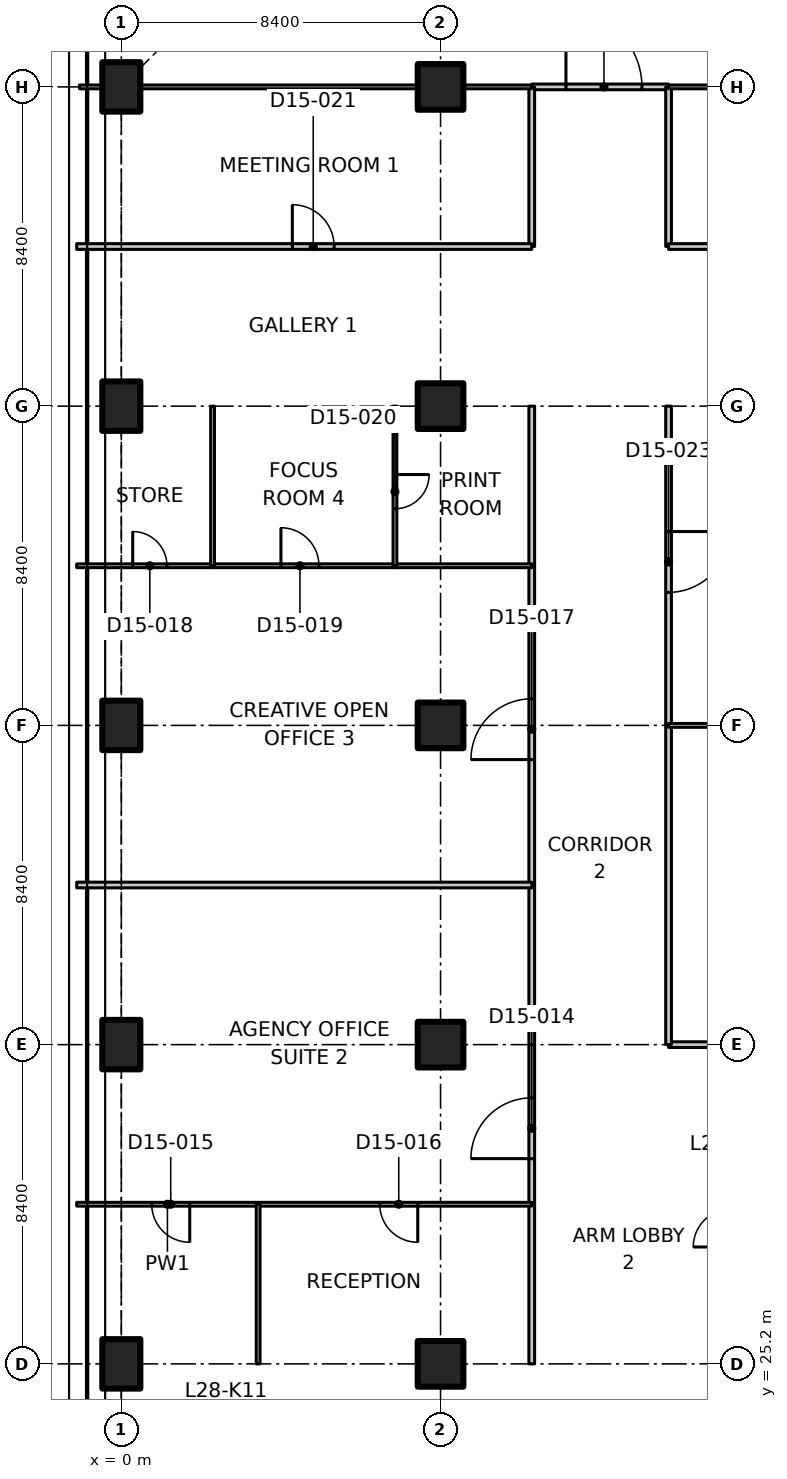
"""IFC4 building model, lengths in metres.
Left out: names, types, materials, properties, quantities, classifications, styles, units other than length and angle.
Written with IfcOpenShell. Run it as: python <this file> out.ifc"""

import sys

from ifc_helpers import new_model, si_unit, direction, frame, frame_2d, origin, origin_2d, place, context, subcontext, project, spatial, polyline, rectangle, outline, extrude, element, fill, save


model = new_model("IFC4")
c1 = context("Model", 3, precision=1e-05, world=origin(), true_north=direction((0.0, 1.0)))
c2 = subcontext(c1, "Body", "Model", "MODEL_VIEW")
j1 = project(units=[si_unit("LENGTHUNIT", "METRE"), si_unit("PLANEANGLEUNIT", "RADIAN")], contexts=[c1])
p1 = place(None, origin())
s1 = spatial("IfcSite", under=j1, at=p1, CompositionType="ELEMENT")
p2 = place(p1, origin())
s2 = spatial("IfcBuilding", under=s1, at=p2, CompositionType="ELEMENT")
p3 = place(p2, frame((0.0, 0.0, 116.9)))
s3 = spatial("IfcBuildingStorey", under=s2, at=p3, CompositionType="ELEMENT", Elevation=116.9)
for number, where, z_axis, x_axis in (
    (1, (0.0, 25.2, 0.0), (0.0, 0.0, 1.0), (1.0, 0.0, 0.0)),
    (2, (0.0, 33.6, 0.0), (0.0, 0.0, 1.0), (1.0, 0.0, 0.0)),
    (3, (0.0, 42.0, 0.0), (0.0, 0.0, 1.0), (1.0, 0.0, 0.0)),
    (4, (0.0, 50.4, 0.0), (0.0, 0.0, 1.0), (1.0, 0.0, 0.0)),
    (5, (0.0, 58.8, 0.0), (0.0, 0.0, 1.0), (1.0, 0.0, 0.0)),
):
    element("IfcColumn", number, at=place(p3, frame(where, z_axis=z_axis, x_axis=x_axis)), inside=s3, PredefinedType="COLUMN", context=c2, shape_type="SweptSolid", body=[
        extrude(rectangle(XDim=1.0, YDim=1.3, at=origin_2d()), origin(), (0.0, 0.0, 1.0), 3.35),
    ])
for number, where, z_axis, x_axis in (
    (6, (8.4, 25.2, 0.0), (0.0, 0.0, 1.0), (1.0, 0.0, 0.0)),
    (7, (8.4, 33.6, 0.0), (0.0, 0.0, 1.0), (1.0, 0.0, 0.0)),
    (8, (8.4, 42.0, 0.0), (0.0, 0.0, 1.0), (1.0, 0.0, 0.0)),
    (9, (8.4, 50.4, 0.0), (0.0, 0.0, 1.0), (1.0, 0.0, 0.0)),
    (10, (8.4, 58.8, 0.0), (0.0, 0.0, 1.0), (1.0, 0.0, 0.0)),
):
    element("IfcColumn", number, at=place(p3, frame(where, z_axis=z_axis, x_axis=x_axis)), inside=s3, PredefinedType="COLUMN", context=c2, shape_type="SweptSolid", body=[
        extrude(rectangle(XDim=1.2, YDim=1.2, at=origin_2d()), origin(), (0.0, 0.0, 1.0), 3.35),
    ])
p4 = place(p3, frame((10.8, 29.4, 0.0), z_axis=(0.0, 0.0, 1.0), x_axis=(0.0, 1.0, 0.0)))
e11 = element("IfcWall", 11, at=p4, inside=s3, PredefinedType="PARTITIONING", context=c2, shape_type="SweptSolid", body=[
    extrude(rectangle(XDim=4.2, YDim=0.15, at=frame_2d((2.1, 0.0))), origin(), (0.0, 0.0, 1.0), 3.33),
])
p5 = place(p4, frame((1.2, 0.0, 0.0)))
e12 = element("IfcOpeningElement", 12, at=p5, cuts=e11, PredefinedType="OPENING", context=c2, shape_type="SweptSolid", body=[
    extrude(rectangle(XDim=1.6, YDim=2.1, at=frame_2d((0.8, 1.05))), frame((0.0, 0.085, 0.0), z_axis=(0.0, -1.0, 0.0), x_axis=(1.0, 0.0, 0.0)), (0.0, 0.0, 1.0), 0.17),
])
p6 = place(p3, frame((10.8, 25.2, 0.0), z_axis=(0.0, 0.0, 1.0), x_axis=(0.0, 1.0, 0.0)))
e13 = element("IfcWall", 13, at=p6, inside=s3, PredefinedType="PARTITIONING", context=c2, shape_type="SweptSolid", body=[
    extrude(rectangle(XDim=4.2, YDim=0.15, at=frame_2d((2.1, 0.0))), origin(), (0.0, 0.0, 1.0), 3.33),
])
p7 = place(p3, frame((14.4, 33.6, 0.0), z_axis=(0.0, 0.0, 1.0), x_axis=(1.0, 0.0, 0.0)))
e14 = element("IfcWall", 14, at=p7, inside=s3, PredefinedType="PARTITIONING", context=c2, shape_type="SweptSolid", body=[
    extrude(rectangle(XDim=1.5, YDim=0.15, at=frame_2d((0.75, 0.0))), origin(), (0.0, 0.0, 1.0), 3.33),
])
p8 = place(p3, frame((10.8, 58.8, 0.0), z_axis=(0.0, 0.0, 1.0), x_axis=(1.0, 0.0, 0.0)))
e15 = element("IfcWall", 15, at=p8, inside=s3, PredefinedType="PARTITIONING", context=c2, shape_type="SweptSolid", body=[
    extrude(rectangle(XDim=3.6, YDim=0.15, at=frame_2d((1.8, 0.0))), origin(), (0.0, 0.0, 1.0), 3.33),
])
p9 = place(p8, frame((0.9, 0.0, 0.0)))
e16 = element("IfcOpeningElement", 16, at=p9, cuts=e15, PredefinedType="OPENING", context=c2, shape_type="SweptSolid", body=[
    extrude(rectangle(XDim=2.0, YDim=2.4, at=frame_2d((1.0, 1.2))), frame((0.0, 0.085, 0.0), z_axis=(0.0, -1.0, 0.0), x_axis=(1.0, 0.0, 0.0)), (0.0, 0.0, 1.0), 0.17),
])
p10 = place(p3, frame((10.8, 33.6, 0.0), z_axis=(0.0, 0.0, 1.0), x_axis=(0.0, 1.0, 0.0)))
e17 = element("IfcWall", 17, at=p10, inside=s3, PredefinedType="PARTITIONING", context=c2, shape_type="SweptSolid", body=[
    extrude(rectangle(XDim=4.2, YDim=0.15, at=frame_2d((2.1, 0.0))), origin(), (0.0, 0.0, 1.0), 3.33),
])
p11 = place(p3, frame((10.8, 37.8, 0.0), z_axis=(0.0, 0.0, 1.0), x_axis=(0.0, 1.0, 0.0)))
e18 = element("IfcWall", 18, at=p11, inside=s3, PredefinedType="PARTITIONING", context=c2, shape_type="SweptSolid", body=[
    extrude(rectangle(XDim=8.4, YDim=0.15, at=frame_2d((4.2, 0.0))), origin(), (0.0, 0.0, 1.0), 3.33),
])
p12 = place(p11, frame((3.3, 0.0, 0.0)))
e19 = element("IfcOpeningElement", 19, at=p12, cuts=e18, PredefinedType="OPENING", context=c2, shape_type="SweptSolid", body=[
    extrude(rectangle(XDim=1.6, YDim=2.1, at=frame_2d((0.8, 1.05))), frame((0.0, 0.085, 0.0), z_axis=(0.0, -1.0, 0.0), x_axis=(1.0, 0.0, 0.0)), (0.0, 0.0, 1.0), 0.17),
])
for number, where, z_axis, x_axis in (
    (20, (10.8, 46.2, 0.0), (0.0, 0.0, 1.0), (0.0, 1.0, 0.0)),
    (21, (10.8, 54.6, 0.0), (0.0, 0.0, 1.0), (0.0, 1.0, 0.0)),
):
    element("IfcWall", number, at=place(p3, frame(where, z_axis=z_axis, x_axis=x_axis)), inside=s3, PredefinedType="PARTITIONING", context=c2, shape_type="SweptSolid", body=[
        extrude(rectangle(XDim=4.2, YDim=0.15, at=frame_2d((2.1, 0.0))), origin(), (0.0, 0.0, 1.0), 3.33),
    ])
p13 = place(p3, frame((14.4, 42.0, 0.0), z_axis=(0.0, 0.0, 1.0), x_axis=(0.0, -1.0, 0.0)))
e22 = element("IfcWall", 22, at=p13, inside=s3, PredefinedType="PARTITIONING", context=c2, shape_type="SweptSolid", body=[
    extrude(rectangle(XDim=8.4, YDim=0.15, at=frame_2d((4.2, 0.0))), origin(), (0.0, 0.0, 1.0), 3.33),
])
p14 = place(p3, frame((14.4, 50.4, 0.0), z_axis=(0.0, 0.0, 1.0), x_axis=(0.0, -1.0, 0.0)))
e23 = element("IfcWall", 23, at=p14, inside=s3, PredefinedType="PARTITIONING", context=c2, shape_type="SweptSolid", body=[
    extrude(rectangle(XDim=8.4, YDim=0.15, at=frame_2d((4.2, 0.0))), origin(), (0.0, 0.0, 1.0), 3.33),
])
p15 = place(p14, frame((3.3, 0.0, 0.0)))
e24 = element("IfcOpeningElement", 24, at=p15, cuts=e23, PredefinedType="OPENING", context=c2, shape_type="SweptSolid", body=[
    extrude(rectangle(XDim=1.6, YDim=2.1, at=frame_2d((0.8, 1.05))), frame((0.0, 0.085, 0.0), z_axis=(0.0, -1.0, 0.0), x_axis=(1.0, 0.0, 0.0)), (0.0, 0.0, 1.0), 0.17),
])
p16 = place(p3, frame((14.4, 58.8, 0.0), z_axis=(0.0, 0.0, 1.0), x_axis=(0.0, -1.0, 0.0)))
e25 = element("IfcWall", 25, at=p16, inside=s3, PredefinedType="PARTITIONING", context=c2, shape_type="SweptSolid", body=[
    extrude(rectangle(XDim=4.2, YDim=0.15, at=frame_2d((2.1, 0.0))), origin(), (0.0, 0.0, 1.0), 3.33),
])
p17 = place(p3, frame((10.8, 58.8, 0.0), z_axis=(0.0, 0.0, 1.0), x_axis=(-1.0, 0.0, 0.0)))
e26 = element("IfcWall", 26, at=p17, inside=s3, PredefinedType="PARTITIONING", context=c2, shape_type="SweptSolid", body=[
    extrude(rectangle(XDim=1.78, YDim=0.1, at=frame_2d((0.89, 0.0))), origin(), (0.0, 0.0, 1.0), 3.33),
])
p18 = place(p3, frame((7.78, 58.8, 0.0), z_axis=(0.0, 0.0, 1.0), x_axis=(-1.0, 0.0, 0.0)))
e27 = element("IfcWall", 27, at=p18, inside=s3, PredefinedType="PARTITIONING", context=c2, shape_type="SweptSolid", body=[
    extrude(outline(polyline([(0.0, 0.0), (7.26, 0.0), (7.26, 2.98), (7.116, 2.98), (7.114, 3.33), (0.0, 3.33), (0.0, 0.0)])), frame((0.0, 0.05, 0.0), z_axis=(0.0, -1.0, 0.0), x_axis=(1.0, 0.0, 0.0)), (0.0, 0.0, 1.0), 0.1),
])
p19 = place(p3, frame((-0.52, 58.8, 0.0), z_axis=(0.0, 0.0, 1.0), x_axis=(-1.0, 0.0, 0.0)))
e28 = element("IfcWall", 28, at=p19, inside=s3, PredefinedType="PARTITIONING", context=c2, shape_type="SweptSolid", body=[
    extrude(rectangle(XDim=0.58, YDim=0.1, at=frame_2d((0.29, 0.0))), origin(), (0.0, 0.0, 1.0), 3.33),
])
p20 = place(p3, frame((16.18, 58.8, 0.0), z_axis=(0.0, 0.0, 1.0), x_axis=(-1.0, 0.0, 0.0)))
e29 = element("IfcWall", 29, at=p20, inside=s3, PredefinedType="PARTITIONING", context=c2, shape_type="SweptSolid", body=[
    extrude(rectangle(XDim=1.78, YDim=0.1, at=frame_2d((0.89, 0.0))), origin(), (0.0, 0.0, 1.0), 3.33),
])
p21 = place(p3, frame((-1.174, 54.6, 0.0), z_axis=(0.0, 0.0, 1.0), x_axis=(1.0, 0.0, 0.0)))
e30 = element("IfcWall", 30, at=p21, inside=s3, PredefinedType="PARTITIONING", context=c2, shape_type="SweptSolid", body=[
    extrude(outline(polyline([(0.0, 0.0), (11.974, 0.0), (11.974, 3.33), (1.624, 3.33), (1.622, 2.98), (0.726, 2.98), (0.724, 3.33), (0.074, 3.33), (0.0, 3.33), (0.0, 0.0)])), frame((0.0, 0.075, 0.0), z_axis=(0.0, -1.0, 0.0), x_axis=(1.0, 0.0, 0.0)), (0.0, 0.0, 1.0), 0.15),
])
p22 = place(p21, frame((5.674, 0.0, 0.0)))
e31 = element("IfcOpeningElement", 31, at=p22, cuts=e30, PredefinedType="OPENING", context=c2, shape_type="SweptSolid", body=[
    extrude(rectangle(XDim=1.1, YDim=2.1, at=frame_2d((0.55, 1.05))), frame((0.0, 0.085, 0.0), z_axis=(0.0, -1.0, 0.0), x_axis=(1.0, 0.0, 0.0)), (0.0, 0.0, 1.0), 0.17),
])
p23 = place(p3, frame((3.6, 29.4, 0.0), z_axis=(0.0, 0.0, 1.0), x_axis=(-1.0, 0.0, 0.0)))
e32 = element("IfcWall", 32, at=p23, inside=s3, PredefinedType="PARTITIONING", context=c2, shape_type="SweptSolid", body=[
    extrude(outline(polyline([(0.0, 0.0), (4.774, 0.0), (4.774, 3.33), (4.7, 3.33), (4.05, 3.33), (4.048, 2.98), (3.152, 2.98), (3.15, 3.33), (0.0, 3.33), (0.0, 0.0)])), frame((0.0, 0.05, 0.0), z_axis=(0.0, -1.0, 0.0), x_axis=(1.0, 0.0, 0.0)), (0.0, 0.0, 1.0), 0.1),
])
p24 = place(p23, frame((1.8, 0.0, 0.0)))
e33 = element("IfcOpeningElement", 33, at=p24, cuts=e32, PredefinedType="OPENING", context=c2, shape_type="SweptSolid", body=[
    extrude(rectangle(XDim=1.0, YDim=2.1, at=frame_2d((0.5, 1.05))), frame((0.0, 0.06, 0.0), z_axis=(0.0, -1.0, 0.0), x_axis=(1.0, 0.0, 0.0)), (0.0, 0.0, 1.0), 0.12),
])
p25 = place(p3, frame((10.8, 29.4, 0.0), z_axis=(0.0, 0.0, 1.0), x_axis=(-1.0, 0.0, 0.0)))
e34 = element("IfcWall", 34, at=p25, inside=s3, PredefinedType="PARTITIONING", context=c2, shape_type="SweptSolid", body=[
    extrude(rectangle(XDim=7.2, YDim=0.1, at=frame_2d((3.6, 0.0))), origin(), (0.0, 0.0, 1.0), 3.33),
])
p26 = place(p25, frame((3.0, 0.0, 0.0)))
e35 = element("IfcOpeningElement", 35, at=p26, cuts=e34, PredefinedType="OPENING", context=c2, shape_type="SweptSolid", body=[
    extrude(rectangle(XDim=1.0, YDim=2.1, at=frame_2d((0.5, 1.05))), frame((0.0, 0.06, 0.0), z_axis=(0.0, -1.0, 0.0), x_axis=(1.0, 0.0, 0.0)), (0.0, 0.0, 1.0), 0.12),
])
p27 = place(p3, frame((-1.174, 37.8, 0.0), z_axis=(0.0, 0.0, 1.0), x_axis=(1.0, 0.0, 0.0)))
e36 = element("IfcWall", 36, at=p27, inside=s3, PredefinedType="PARTITIONING", context=c2, shape_type="SweptSolid", body=[
    extrude(outline(polyline([(0.0, 0.0), (11.974, 0.0), (11.974, 3.33), (1.624, 3.33), (1.622, 2.98), (0.726, 2.98), (0.724, 3.33), (0.074, 3.33), (0.0, 3.33), (0.0, 0.0)])), frame((0.0, 0.075, 0.0), z_axis=(0.0, -1.0, 0.0), x_axis=(1.0, 0.0, 0.0)), (0.0, 0.0, 1.0), 0.15),
])
p28 = place(p3, frame((3.6, 29.4, 0.0), z_axis=(0.0, 0.0, 1.0), x_axis=(0.0, -1.0, 0.0)))
e37 = element("IfcWall", 37, at=p28, inside=s3, PredefinedType="PARTITIONING", context=c2, shape_type="SweptSolid", body=[
    extrude(rectangle(XDim=4.2, YDim=0.1, at=frame_2d((2.1, 0.0))), origin(), (0.0, 0.0, 1.0), 3.33),
])
p29 = place(p3, frame((-1.174, 46.2, 0.0), z_axis=(0.0, 0.0, 1.0), x_axis=(1.0, 0.0, 0.0)))
e38 = element("IfcWall", 38, at=p29, inside=s3, PredefinedType="PARTITIONING", context=c2, shape_type="SweptSolid", body=[
    extrude(rectangle(XDim=3.574, YDim=0.1, at=frame_2d((1.787, 0.0))), origin(), (0.0, 0.0, 1.0), 2.98),
])
p30 = place(p29, frame((1.474, 0.0, 0.0)))
e39 = element("IfcOpeningElement", 39, at=p30, cuts=e38, PredefinedType="OPENING", context=c2, shape_type="SweptSolid", body=[
    extrude(rectangle(XDim=0.9, YDim=2.1, at=frame_2d((0.45, 1.05))), frame((0.0, 0.06, 0.0), z_axis=(0.0, -1.0, 0.0), x_axis=(1.0, 0.0, 0.0)), (0.0, 0.0, 1.0), 0.12),
])
p31 = place(p3, frame((2.4, 46.2, 0.0), z_axis=(0.0, 0.0, 1.0), x_axis=(1.0, 0.0, 0.0)))
e40 = element("IfcWall", 40, at=p31, inside=s3, PredefinedType="PARTITIONING", context=c2, shape_type="SweptSolid", body=[
    extrude(rectangle(XDim=4.8, YDim=0.1, at=frame_2d((2.4, 0.0))), origin(), (0.0, 0.0, 1.0), 3.33),
])
p32 = place(p31, frame((1.8, 0.0, 0.0)))
e41 = element("IfcOpeningElement", 41, at=p32, cuts=e40, PredefinedType="OPENING", context=c2, shape_type="SweptSolid", body=[
    extrude(rectangle(XDim=1.0, YDim=2.1, at=frame_2d((0.5, 1.05))), frame((0.0, 0.06, 0.0), z_axis=(0.0, -1.0, 0.0), x_axis=(1.0, 0.0, 0.0)), (0.0, 0.0, 1.0), 0.12),
])
p33 = place(p3, frame((7.2, 46.2, 0.0), z_axis=(0.0, 0.0, 1.0), x_axis=(1.0, 0.0, 0.0)))
e42 = element("IfcWall", 42, at=p33, inside=s3, PredefinedType="PARTITIONING", context=c2, shape_type="SweptSolid", body=[
    extrude(rectangle(XDim=3.6, YDim=0.1, at=frame_2d((1.8, 0.0))), origin(), (0.0, 0.0, 1.0), 3.33),
])
p34 = place(p3, frame((2.4, 50.4, 0.0), z_axis=(0.0, 0.0, 1.0), x_axis=(0.0, -1.0, 0.0)))
e43 = element("IfcWall", 43, at=p34, inside=s3, PredefinedType="PARTITIONING", context=c2, shape_type="SweptSolid", body=[
    extrude(rectangle(XDim=4.2, YDim=0.1, at=frame_2d((2.1, 0.0))), origin(), (0.0, 0.0, 1.0), 3.33),
])
p35 = place(p3, frame((7.2, 50.4, 0.0), z_axis=(0.0, 0.0, 1.0), x_axis=(0.0, -1.0, 0.0)))
e44 = element("IfcWall", 44, at=p35, inside=s3, PredefinedType="PARTITIONING", context=c2, shape_type="SweptSolid", body=[
    extrude(rectangle(XDim=4.2, YDim=0.1, at=frame_2d((2.1, 0.0))), origin(), (0.0, 0.0, 1.0), 3.33),
])
p36 = place(p35, frame((1.8, 0.0, 0.0)))
e45 = element("IfcOpeningElement", 45, at=p36, cuts=e44, PredefinedType="OPENING", context=c2, shape_type="SweptSolid", body=[
    extrude(rectangle(XDim=0.9, YDim=2.1, at=frame_2d((0.45, 1.05))), frame((0.0, 0.06, 0.0), z_axis=(0.0, -1.0, 0.0), x_axis=(1.0, 0.0, 0.0)), (0.0, 0.0, 1.0), 0.12),
])
p37 = place(p3, frame((14.4, 54.6, 0.0), z_axis=(0.0, 0.0, 1.0), x_axis=(1.0, 0.0, 0.0)))
e46 = element("IfcWall", 46, at=p37, inside=s3, PredefinedType="PARTITIONING", context=c2, shape_type="SweptSolid", body=[
    extrude(outline(polyline([(0.0, 0.0), (11.974, 0.0), (11.974, 3.33), (11.9, 3.33), (11.25, 3.33), (11.248, 2.98), (10.352, 2.98), (10.35, 3.33), (0.0, 3.33), (0.0, 0.0)])), frame((0.0, 0.075, 0.0), z_axis=(0.0, -1.0, 0.0), x_axis=(1.0, 0.0, 0.0)), (0.0, 0.0, 1.0), 0.15),
])
p38 = place(p37, frame((5.4, 0.0, 0.0)))
e47 = element("IfcOpeningElement", 47, at=p38, cuts=e46, PredefinedType="OPENING", context=c2, shape_type="SweptSolid", body=[
    extrude(rectangle(XDim=1.1, YDim=2.1, at=frame_2d((0.55, 1.05))), frame((0.0, 0.085, 0.0), z_axis=(0.0, -1.0, 0.0), x_axis=(1.0, 0.0, 0.0)), (0.0, 0.0, 1.0), 0.17),
])
p39 = place(p3, frame((14.4, 42.0, 0.0), z_axis=(0.0, 0.0, 1.0), x_axis=(1.0, 0.0, 0.0)))
e48 = element("IfcWall", 48, at=p39, inside=s3, PredefinedType="PARTITIONING", context=c2, shape_type="SweptSolid", body=[
    extrude(rectangle(XDim=1.78, YDim=0.1, at=frame_2d((0.89, 0.0))), origin(), (0.0, 0.0, 1.0), 3.33),
])
p40 = place(p9, origin())
e49 = element("IfcDoor", 49, at=p40, inside=s3, OperationType="DOUBLE_DOOR_SINGLE_SWING", PredefinedType="DOOR", context=c2, shape_type="SweptSolid", body=[
    extrude(rectangle(XDim=2.0, YDim=2.4, at=frame_2d((1.0, 1.2))), frame((0.0, 0.025, 0.0), z_axis=(0.0, -1.0, 0.0), x_axis=(1.0, 0.0, 0.0)), (0.0, 0.0, 1.0), 0.05),
])
fill(e16, e49)
p41 = place(p5, origin())
e50 = element("IfcDoor", 50, at=p41, inside=s3, OperationType="DOUBLE_DOOR_SINGLE_SWING", PredefinedType="DOOR", context=c2, shape_type="SweptSolid", body=[
    extrude(rectangle(XDim=1.6, YDim=2.1, at=frame_2d((0.8, 1.05))), frame((0.0, 0.025, 0.0), z_axis=(0.0, -1.0, 0.0), x_axis=(1.0, 0.0, 0.0)), (0.0, 0.0, 1.0), 0.05),
])
fill(e12, e50)
p42 = place(p24, origin())
e51 = element("IfcDoor", 51, at=p42, inside=s3, OperationType="SINGLE_SWING_LEFT", PredefinedType="DOOR", context=c2, shape_type="SweptSolid", body=[
    extrude(rectangle(XDim=1.0, YDim=2.1, at=frame_2d((0.5, 1.05))), frame((0.0, 0.025, 0.0), z_axis=(0.0, -1.0, 0.0), x_axis=(1.0, 0.0, 0.0)), (0.0, 0.0, 1.0), 0.05),
])
fill(e33, e51)
p43 = place(p26, origin())
e52 = element("IfcDoor", 52, at=p43, inside=s3, OperationType="SINGLE_SWING_LEFT", PredefinedType="DOOR", context=c2, shape_type="SweptSolid", body=[
    extrude(rectangle(XDim=1.0, YDim=2.1, at=frame_2d((0.5, 1.05))), frame((0.0, 0.025, 0.0), z_axis=(0.0, -1.0, 0.0), x_axis=(1.0, 0.0, 0.0)), (0.0, 0.0, 1.0), 0.05),
])
fill(e35, e52)
p44 = place(p12, origin())
e53 = element("IfcDoor", 53, at=p44, inside=s3, OperationType="DOUBLE_DOOR_SINGLE_SWING", PredefinedType="DOOR", context=c2, shape_type="SweptSolid", body=[
    extrude(rectangle(XDim=1.6, YDim=2.1, at=frame_2d((0.8, 1.05))), frame((0.0, 0.025, 0.0), z_axis=(0.0, -1.0, 0.0), x_axis=(1.0, 0.0, 0.0)), (0.0, 0.0, 1.0), 0.05),
])
fill(e19, e53)
p45 = place(p30, origin())
e54 = element("IfcDoor", 54, at=p45, inside=s3, OperationType="SINGLE_SWING_LEFT", PredefinedType="DOOR", context=c2, shape_type="SweptSolid", body=[
    extrude(rectangle(XDim=0.9, YDim=2.1, at=frame_2d((0.45, 1.05))), frame((0.0, 0.025, 0.0), z_axis=(0.0, -1.0, 0.0), x_axis=(1.0, 0.0, 0.0)), (0.0, 0.0, 1.0), 0.05),
])
fill(e39, e54)
p46 = place(p32, origin())
e55 = element("IfcDoor", 55, at=p46, inside=s3, OperationType="SINGLE_SWING_LEFT", PredefinedType="DOOR", context=c2, shape_type="SweptSolid", body=[
    extrude(rectangle(XDim=1.0, YDim=2.1, at=frame_2d((0.5, 1.05))), frame((0.0, 0.025, 0.0), z_axis=(0.0, -1.0, 0.0), x_axis=(1.0, 0.0, 0.0)), (0.0, 0.0, 1.0), 0.05),
])
fill(e41, e55)
p47 = place(p36, origin())
e56 = element("IfcDoor", 56, at=p47, inside=s3, OperationType="SINGLE_SWING_LEFT", PredefinedType="DOOR", context=c2, shape_type="SweptSolid", body=[
    extrude(rectangle(XDim=0.9, YDim=2.1, at=frame_2d((0.45, 1.05))), frame((0.0, 0.025, 0.0), z_axis=(0.0, -1.0, 0.0), x_axis=(1.0, 0.0, 0.0)), (0.0, 0.0, 1.0), 0.05),
])
fill(e45, e56)
p48 = place(p22, origin())
e57 = element("IfcDoor", 57, at=p48, inside=s3, OperationType="SINGLE_SWING_LEFT", PredefinedType="DOOR", context=c2, shape_type="SweptSolid", body=[
    extrude(rectangle(XDim=1.1, YDim=2.1, at=frame_2d((0.55, 1.05))), frame((0.0, 0.025, 0.0), z_axis=(0.0, -1.0, 0.0), x_axis=(1.0, 0.0, 0.0)), (0.0, 0.0, 1.0), 0.05),
])
fill(e31, e57)
p49 = place(p15, origin())
e58 = element("IfcDoor", 58, at=p49, inside=s3, OperationType="DOUBLE_DOOR_SINGLE_SWING", PredefinedType="DOOR", context=c2, shape_type="SweptSolid", body=[
    extrude(rectangle(XDim=1.6, YDim=2.1, at=frame_2d((0.8, 1.05))), frame((0.0, 0.025, 0.0), z_axis=(0.0, -1.0, 0.0), x_axis=(1.0, 0.0, 0.0)), (0.0, 0.0, 1.0), 0.05),
])
fill(e24, e58)
save(model, sys.argv[1])
